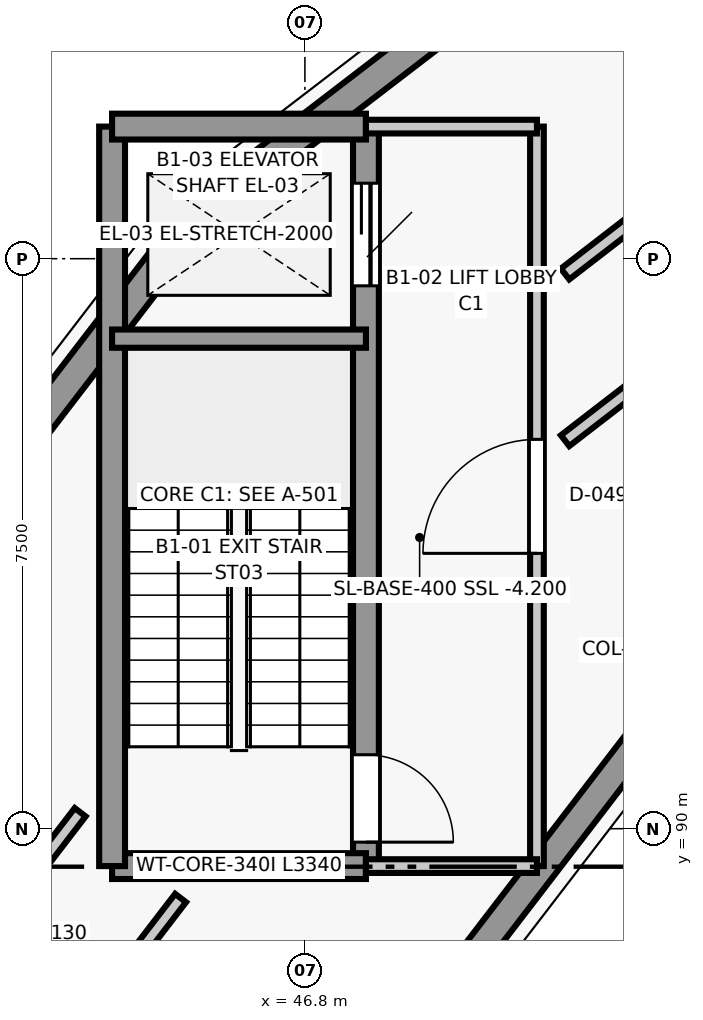
"""IFC4 building model, lengths in metres.
Left out: names, types, materials, properties, quantities, classifications, styles, units other than length and angle.
Written with IfcOpenShell. Run it as: python <this file> out.ifc"""

import sys

from ifc_helpers import new_model, si_unit, direction, frame, frame_2d, origin, place, context, subcontext, project, spatial, rectangle, extrude, element, fill, save


model = new_model("IFC4")
c1 = context("Model", 3, precision=1e-05, world=origin(), true_north=direction((0.0, 1.0)))
c2 = subcontext(c1, "Body", "Model", "MODEL_VIEW")
j1 = project(units=[si_unit("LENGTHUNIT", "METRE"), si_unit("PLANEANGLEUNIT", "RADIAN")], contexts=[c1])
p1 = place(None, origin())
s1 = spatial("IfcSite", under=j1, at=p1, CompositionType="ELEMENT")
p2 = place(p1, origin())
s2 = spatial("IfcBuilding", under=s1, at=p2, CompositionType="ELEMENT")
p3 = place(p2, frame((0.0, 0.0, -4.2)))
s3 = spatial("IfcBuildingStorey", under=s2, at=p3, CompositionType="ELEMENT", Elevation=-4.2)
p4 = place(p3, frame((45.402, 98.098, 0.0), z_axis=(0.0, 0.0, 1.0), x_axis=(0.793347191248, 0.608769442514, 0.0)))
e1 = element("IfcWall", 1, at=p4, inside=s3, PredefinedType="SHEAR", context=c2, shape_type="SweptSolid", body=[
    extrude(rectangle(XDim=11.587, YDim=0.4, at=frame_2d((5.793, 0.0))), origin(), (0.0, 0.0, 1.0), 3.92),
])
p5 = place(p3, frame((38.436, 89.019, 0.0), z_axis=(0.0, 0.0, 1.0), x_axis=(0.608753523874, 0.793359406052, 0.0)))
e2 = element("IfcWall", 2, at=p5, inside=s3, PredefinedType="SHEAR", context=c2, shape_type="SweptSolid", body=[
    extrude(rectangle(XDim=11.444, YDim=0.4, at=frame_2d((5.722, 0.0))), origin(), (0.0, 0.0, 1.0), 3.92),
])
p6 = place(p3, frame((51.481, 91.524, 0.0), z_axis=(0.0, 0.0, 1.0), x_axis=(-0.608769580289, -0.793347085527, 0.0)))
e3 = element("IfcWall", 3, at=p6, inside=s3, PredefinedType="SHEAR", context=c2, shape_type="SweptSolid", body=[
    extrude(rectangle(XDim=9.005, YDim=0.38, at=frame_2d((4.502, 0.0))), origin(), (0.0, 0.0, 1.0), 3.92),
])
p7 = place(p3, frame((47.603, 99.238, 0.0), z_axis=(0.0, 0.0, 1.0), x_axis=(0.0, -1.0, 0.0)))
e4 = element("IfcWall", 4, at=p7, inside=s3, PredefinedType="SHEAR", context=c2, shape_type="SweptSolid", body=[
    extrude(rectangle(XDim=9.73, YDim=0.34, at=frame_2d((4.865, 0.0))), origin(), (0.0, 0.0, 1.0), 4.2),
])
p8 = place(p7, frame((8.265, 0.0, 0.0)))
e5 = element("IfcOpeningElement", 5, at=p8, cuts=e4, PredefinedType="OPENING", context=c2, shape_type="SweptSolid", body=[
    extrude(rectangle(XDim=1.15, YDim=2.15, at=frame_2d((0.575, 1.075))), frame((0.0, 0.18, 0.0), z_axis=(0.0, -1.0, 0.0), x_axis=(1.0, 0.0, 0.0)), (0.0, 0.0, 1.0), 0.36),
])
p9 = place(p7, frame((0.745, 0.0, 0.0)))
e6 = element("IfcOpeningElement", 6, at=p9, cuts=e4, PredefinedType="OPENING", context=c2, shape_type="SweptSolid", body=[
    extrude(rectangle(XDim=1.35, YDim=2.15, at=frame_2d((0.675, 1.075))), frame((0.0, 0.18, 0.0), z_axis=(0.0, -1.0, 0.0), x_axis=(1.0, 0.0, 0.0)), (0.0, 0.0, 1.0), 0.36),
])
p10 = place(p3, frame((47.603, 89.508, 0.0), z_axis=(0.0, 0.0, 1.0), x_axis=(-1.0, 0.0, 0.0)))
e7 = element("IfcWall", 7, at=p10, inside=s3, PredefinedType="SHEAR", context=c2, shape_type="SweptSolid", body=[
    extrude(rectangle(XDim=3.34, YDim=0.34, at=frame_2d((1.67, 0.0))), origin(), (0.0, 0.0, 1.0), 4.2),
])
p11 = place(p3, frame((44.263, 89.508, 0.0), z_axis=(0.0, 0.0, 1.0), x_axis=(0.0, 1.0, 0.0)))
e8 = element("IfcWall", 8, at=p11, inside=s3, PredefinedType="SHEAR", context=c2, shape_type="SweptSolid", body=[
    extrude(rectangle(XDim=9.73, YDim=0.34, at=frame_2d((4.865, 0.0))), origin(), (0.0, 0.0, 1.0), 4.2),
])
p12 = place(p3, frame((44.263, 99.238, 0.0), z_axis=(0.0, 0.0, 1.0), x_axis=(1.0, 0.0, 0.0)))
e9 = element("IfcWall", 9, at=p12, inside=s3, PredefinedType="SHEAR", context=c2, shape_type="SweptSolid", body=[
    extrude(rectangle(XDim=3.34, YDim=0.34, at=frame_2d((1.67, 0.0))), origin(), (0.0, 0.0, 1.0), 4.2),
])
p13 = place(p3, frame((47.603, 96.448, 0.0), z_axis=(0.0, 0.0, 1.0), x_axis=(-1.0, 0.0, 0.0)))
e10 = element("IfcWall", 10, at=p13, inside=s3, PredefinedType="SHEAR", context=c2, shape_type="SweptSolid", body=[
    extrude(rectangle(XDim=3.34, YDim=0.24, at=frame_2d((1.67, 0.0))), origin(), (0.0, 0.0, 1.0), 4.2),
])
p14 = place(p3, frame((49.853, 89.508, 0.0), z_axis=(0.0, 0.0, 1.0), x_axis=(0.0, 1.0, 0.0)))
e11 = element("IfcWall", 11, at=p14, inside=s3, PredefinedType="PARTITIONING", context=c2, shape_type="SweptSolid", body=[
    extrude(rectangle(XDim=9.73, YDim=0.18, at=frame_2d((4.865, 0.0))), origin(), (0.0, 0.0, 1.0), 3.915),
])
p15 = place(p14, frame((4.115, 0.0, 0.0)))
e12 = element("IfcOpeningElement", 12, at=p15, cuts=e11, PredefinedType="OPENING", context=c2, shape_type="SweptSolid", body=[
    extrude(rectangle(XDim=1.5, YDim=2.15, at=frame_2d((0.75, 1.075))), frame((0.0, 0.1, 0.0), z_axis=(0.0, -1.0, 0.0), x_axis=(1.0, 0.0, 0.0)), (0.0, 0.0, 1.0), 0.2),
])
for number, where, z_axis, x_axis in (
    (13, (47.603, 89.508, 0.0), (0.0, 0.0, 1.0), (1.0, 0.0, 0.0)),
    (14, (47.603, 99.238, 0.0), (0.0, 0.0, 1.0), (1.0, 0.0, 0.0)),
):
    element("IfcWall", number, at=place(p3, frame(where, z_axis=z_axis, x_axis=x_axis)), inside=s3, PredefinedType="PARTITIONING", context=c2, shape_type="SweptSolid", body=[
        extrude(rectangle(XDim=2.25, YDim=0.18, at=frame_2d((1.125, 0.0))), origin(), (0.0, 0.0, 1.0), 3.915),
    ])
p16 = place(p3, frame((56.575, 102.205, 0.0), z_axis=(0.0, 0.0, 1.0), x_axis=(-0.791414761664, -0.61127953918, 0.0)))
e15 = element("IfcWall", 15, at=p16, inside=s3, PredefinedType="PARTITIONING", context=c2, shape_type="SweptSolid", body=[
    extrude(rectangle(XDim=8.026, YDim=0.18, at=frame_2d((4.013, 0.0))), origin(), (0.0, 0.0, 1.0), 3.915),
])
p17 = place(p16, frame((3.263, 0.0, 0.0)))
e16 = element("IfcOpeningElement", 16, at=p17, cuts=e15, PredefinedType="OPENING", context=c2, shape_type="SweptSolid", body=[
    extrude(rectangle(XDim=1.5, YDim=2.15, at=frame_2d((0.75, 1.075))), frame((0.0, 0.1, 0.0), z_axis=(0.0, -1.0, 0.0), x_axis=(1.0, 0.0, 0.0)), (0.0, 0.0, 1.0), 0.2),
])
p18 = place(p3, frame((57.457, 100.693, 0.0), z_axis=(0.0, 0.0, 1.0), x_axis=(-0.79142007835, -0.611272655683, 0.0)))
e17 = element("IfcWall", 17, at=p18, inside=s3, PredefinedType="PARTITIONING", context=c2, shape_type="SweptSolid", body=[
    extrude(rectangle(XDim=9.141, YDim=0.18, at=frame_2d((4.571, 0.0))), origin(), (0.0, 0.0, 1.0), 3.915),
])
p19 = place(p18, frame((3.845, 0.0, 0.0)))
e18 = element("IfcOpeningElement", 18, at=p19, cuts=e17, PredefinedType="OPENING", context=c2, shape_type="SweptSolid", body=[
    extrude(rectangle(XDim=1.45, YDim=2.2, at=frame_2d((0.725, 1.1))), frame((0.0, 0.1, 0.0), z_axis=(0.0, -1.0, 0.0), x_axis=(1.0, 0.0, 0.0)), (0.0, 0.0, 1.0), 0.2),
])
p20 = place(p3, frame((43.843, 90.217, 0.0), z_axis=(0.0, 0.0, 1.0), x_axis=(-0.608738105254, -0.793371236693, 0.0)))
e19 = element("IfcWall", 19, at=p20, inside=s3, PredefinedType="PARTITIONING", context=c2, shape_type="SweptSolid", body=[
    extrude(rectangle(XDim=4.296, YDim=0.18, at=frame_2d((2.148, 0.0))), origin(), (0.0, 0.0, 1.0), 3.915),
])
p21 = place(p20, frame((1.673, 0.0, 0.0)))
e20 = element("IfcOpeningElement", 20, at=p21, cuts=e19, PredefinedType="OPENING", context=c2, shape_type="SweptSolid", body=[
    extrude(rectangle(XDim=0.95, YDim=2.1, at=frame_2d((0.475, 1.05))), frame((0.0, 0.1, 0.0), z_axis=(0.0, -1.0, 0.0), x_axis=(1.0, 0.0, 0.0)), (0.0, 0.0, 1.0), 0.2),
])
p22 = place(p3, frame((45.164, 89.088, 0.0), z_axis=(0.0, 0.0, 1.0), x_axis=(-0.608788255247, -0.793332755074, 0.0)))
e21 = element("IfcWall", 21, at=p22, inside=s3, PredefinedType="PARTITIONING", context=c2, shape_type="SweptSolid", body=[
    extrude(rectangle(XDim=3.979, YDim=0.18, at=frame_2d((1.99, 0.0))), origin(), (0.0, 0.0, 1.0), 3.915),
])
p23 = place(p22, frame((1.465, 0.0, 0.0)))
e22 = element("IfcOpeningElement", 22, at=p23, cuts=e21, PredefinedType="OPENING", context=c2, shape_type="SweptSolid", body=[
    extrude(rectangle(XDim=1.05, YDim=2.1, at=frame_2d((0.525, 1.05))), frame((0.0, 0.1, 0.0), z_axis=(0.0, -1.0, 0.0), x_axis=(1.0, 0.0, 0.0)), (0.0, 0.0, 1.0), 0.2),
])
p24 = place(p8, origin())
e23 = element("IfcDoor", 23, at=p24, inside=s3, OperationType="SINGLE_SWING_RIGHT", PredefinedType="DOOR", context=c2, shape_type="SweptSolid", body=[
    extrude(rectangle(XDim=1.15, YDim=2.15, at=frame_2d((0.575, 1.075))), frame((0.0, 0.025, 0.0), z_axis=(0.0, -1.0, 0.0), x_axis=(1.0, 0.0, 0.0)), (0.0, 0.0, 1.0), 0.05),
])
fill(e5, e23)
p25 = place(p9, origin())
e24 = element("IfcDoor", 24, at=p25, inside=s3, OperationType="SLIDING_TO_LEFT", PredefinedType="DOOR", context=c2, shape_type="SweptSolid", body=[
    extrude(rectangle(XDim=1.35, YDim=2.15, at=frame_2d((0.675, 1.075))), frame((0.0, 0.025, 0.0), z_axis=(0.0, -1.0, 0.0), x_axis=(1.0, 0.0, 0.0)), (0.0, 0.0, 1.0), 0.05),
])
fill(e6, e24)
p26 = place(p15, origin())
e25 = element("IfcDoor", 25, at=p26, inside=s3, OperationType="SINGLE_SWING_LEFT", PredefinedType="DOOR", context=c2, shape_type="SweptSolid", body=[
    extrude(rectangle(XDim=1.5, YDim=2.15, at=frame_2d((0.75, 1.075))), frame((0.0, 0.025, 0.0), z_axis=(0.0, -1.0, 0.0), x_axis=(1.0, 0.0, 0.0)), (0.0, 0.0, 1.0), 0.05),
])
fill(e12, e25)
save(model, sys.argv[1])
